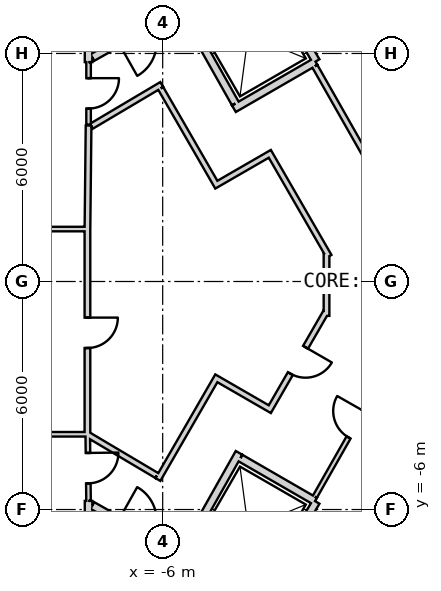
"""IFC4 building model, lengths in metres.
Left out: names, types, materials, properties, quantities, classifications, styles, units other than length and angle.
Written with IfcOpenShell. Run it as: python <this file> out.ifc"""

import sys

from ifc_helpers import new_model, si_unit, direction, frame, frame_2d, origin, place, context, subcontext, project, spatial, rectangle, extrude, element, fill, save


model = new_model("IFC4")
c1 = context("Model", 3, precision=1e-05, world=origin(), true_north=direction((0.0, 1.0)))
c2 = subcontext(c1, "Body", "Model", "MODEL_VIEW")
j1 = project(units=[si_unit("LENGTHUNIT", "METRE"), si_unit("PLANEANGLEUNIT", "RADIAN")], contexts=[c1])
p1 = place(None, origin())
s1 = spatial("IfcSite", under=j1, at=p1, CompositionType="ELEMENT")
p2 = place(p1, origin())
s2 = spatial("IfcBuilding", under=s1, at=p2, CompositionType="ELEMENT")
p3 = place(p2, frame((0.0, 0.0, 415.3)))
s3 = spatial("IfcBuildingStorey", under=s2, at=p3, CompositionType="ELEMENT", Elevation=415.3)
p4 = place(p3, frame((19.475, 2.208, 0.0), z_axis=(0.0, 0.0, 1.0), x_axis=(-0.866028369851, 0.499994862586, 0.0)))
e1 = element("IfcWall", 1, at=p4, inside=s3, PredefinedType="SHEAR", context=c2, shape_type="SweptSolid", body=[
    extrude(rectangle(XDim=31.523, YDim=0.9, at=frame_2d((15.762, 0.0))), origin(), (0.0, 0.0, 1.0), 5.0),
])
p5 = place(p4, frame((3.612, 0.0, 0.0)))
e2 = element("IfcOpeningElement", 2, at=p5, cuts=e1, PredefinedType="OPENING", context=c2, shape_type="SweptSolid", body=[
    extrude(rectangle(XDim=1.2, YDim=2.4, at=frame_2d((0.6, 1.2))), frame((0.0, 0.46, 0.0), z_axis=(0.0, -1.0, 0.0), x_axis=(1.0, 0.0, 0.0)), (0.0, 0.0, 1.0), 0.92),
])
p6 = place(p4, frame((26.712, 0.0, 0.0)))
e3 = element("IfcOpeningElement", 3, at=p6, cuts=e1, PredefinedType="OPENING", context=c2, shape_type="SweptSolid", body=[
    extrude(rectangle(XDim=1.2, YDim=2.4, at=frame_2d((0.6, 1.2))), frame((0.0, 0.46, 0.0), z_axis=(0.0, -1.0, 0.0), x_axis=(1.0, 0.0, 0.0)), (0.0, 0.0, 1.0), 0.92),
])
p7 = place(p3, frame((-7.825, -17.97, 0.0), z_axis=(0.0, 0.0, 1.0), x_axis=(0.866028369851, 0.499994862586, 0.0)))
e4 = element("IfcWall", 4, at=p7, inside=s3, PredefinedType="SHEAR", context=c2, shape_type="SweptSolid", body=[
    extrude(rectangle(XDim=31.523, YDim=0.9, at=frame_2d((15.762, 0.0))), origin(), (0.0, 0.0, 1.0), 5.0),
])
p8 = place(p7, frame((17.862, 0.0, 0.0)))
e5 = element("IfcOpeningElement", 5, at=p8, cuts=e4, PredefinedType="OPENING", context=c2, shape_type="SweptSolid", body=[
    extrude(rectangle(XDim=1.2, YDim=2.4, at=frame_2d((0.6, 1.2))), frame((0.0, 0.46, 0.0), z_axis=(0.0, -1.0, 0.0), x_axis=(1.0, 0.0, 0.0)), (0.0, 0.0, 1.0), 0.92),
])
p9 = place(p7, frame((20.562, 0.0, 0.0)))
e6 = element("IfcOpeningElement", 6, at=p9, cuts=e4, PredefinedType="OPENING", context=c2, shape_type="SweptSolid", body=[
    extrude(rectangle(XDim=1.2, YDim=2.4, at=frame_2d((0.6, 1.2))), frame((0.0, 0.46, 0.0), z_axis=(0.0, -1.0, 0.0), x_axis=(1.0, 0.0, 0.0)), (0.0, 0.0, 1.0), 0.92),
])
p10 = place(p7, frame((26.712, 0.0, 0.0)))
e7 = element("IfcOpeningElement", 7, at=p10, cuts=e4, PredefinedType="OPENING", context=c2, shape_type="SweptSolid", body=[
    extrude(rectangle(XDim=1.2, YDim=2.4, at=frame_2d((0.6, 1.2))), frame((0.0, 0.46, 0.0), z_axis=(0.0, -1.0, 0.0), x_axis=(1.0, 0.0, 0.0)), (0.0, 0.0, 1.0), 0.92),
])
p11 = place(p7, frame((3.612, 0.0, 0.0)))
e8 = element("IfcOpeningElement", 8, at=p11, cuts=e4, PredefinedType="OPENING", context=c2, shape_type="SweptSolid", body=[
    extrude(rectangle(XDim=1.2, YDim=2.4, at=frame_2d((0.6, 1.2))), frame((0.0, 0.46, 0.0), z_axis=(0.0, -1.0, 0.0), x_axis=(1.0, 0.0, 0.0)), (0.0, 0.0, 1.0), 0.92),
])
p12 = place(p3, frame((-3.538, 8.465, 0.0), z_axis=(0.0, 0.0, 1.0), x_axis=(0.508647062354, -0.860975125052, 0.0)))
e9 = element("IfcWall", 9, at=p12, inside=s3, PredefinedType="PLUMBINGWALL", context=c2, shape_type="SweptSolid", body=[
    extrude(rectangle(XDim=3.1, YDim=0.2, at=frame_2d((1.55, 0.0))), origin(), (0.0, 0.0, 1.0), 4.75),
])
p13 = place(p3, frame((-1.979, 5.786, 0.0), z_axis=(0.0, 0.0, 1.0), x_axis=(-0.866016689309, -0.500015093611, 0.0)))
e10 = element("IfcWall", 10, at=p13, inside=s3, PredefinedType="PLUMBINGWALL", context=c2, shape_type="SweptSolid", body=[
    extrude(rectangle(XDim=2.479, YDim=0.2, at=frame_2d((1.24, 0.0))), origin(), (0.0, 0.0, 1.0), 4.75),
])
p14 = place(p3, frame((-5.562, 7.296, 0.0), z_axis=(0.0, 0.0, 1.0), x_axis=(0.49134651263, -0.870964180966, 0.0)))
e11 = element("IfcWall", 11, at=p14, inside=s3, PredefinedType="PLUMBINGWALL", context=c2, shape_type="SweptSolid", body=[
    extrude(rectangle(XDim=3.0, YDim=0.2, at=frame_2d((1.5, 0.0))), origin(), (0.0, 0.0, 1.0), 4.75),
])
p15 = place(p3, frame((-1.961, -5.796, 0.0), z_axis=(0.0, 0.0, 1.0), x_axis=(-0.508647062354, -0.860975125052, 0.0)))
e12 = element("IfcWall", 12, at=p15, inside=s3, PredefinedType="PLUMBINGWALL", context=c2, shape_type="SweptSolid", body=[
    extrude(rectangle(XDim=3.1, YDim=0.2, at=frame_2d((1.55, 0.0))), origin(), (0.0, 0.0, 1.0), 4.75),
])
p16 = place(p3, frame((-3.99, -4.509, 0.0), z_axis=(0.0, 0.0, 1.0), x_axis=(-0.491358283181, -0.870957540612, 0.0)))
e13 = element("IfcWall", 13, at=p16, inside=s3, PredefinedType="PLUMBINGWALL", context=c2, shape_type="SweptSolid", body=[
    extrude(rectangle(XDim=3.2, YDim=0.2, at=frame_2d((1.6, 0.0))), origin(), (0.0, 0.0, 1.0), 4.75),
])
p17 = place(p3, frame((-3.953, -4.646, 0.0), z_axis=(0.0, 0.0, 1.0), x_axis=(0.866065302921, -0.4999308863, 0.0)))
e14 = element("IfcWall", 14, at=p17, inside=s3, PredefinedType="PLUMBINGWALL", context=c2, shape_type="SweptSolid", body=[
    extrude(rectangle(XDim=2.264, YDim=0.2, at=frame_2d((1.132, 0.0))), origin(), (0.0, 0.0, 1.0), 4.75),
])
p18 = place(p3, frame((-11.2, 1.38, 0.0), z_axis=(0.0, 0.0, 1.0), x_axis=(1.0, 0.0, 0.0)))
e15 = element("IfcWall", 15, at=p18, inside=s3, PredefinedType="PARTITIONING", context=c2, shape_type="SweptSolid", body=[
    extrude(rectangle(XDim=3.25, YDim=0.12, at=frame_2d((1.625, 0.0))), origin(), (0.0, 0.0, 1.0), 4.75),
])
p19 = place(p3, frame((-7.95, -9.55, 0.0), z_axis=(0.0, 0.0, 1.0), x_axis=(0.0, 1.0, 0.0)))
e16 = element("IfcWall", 16, at=p19, inside=s3, PredefinedType="PARTITIONING", context=c2, shape_type="SweptSolid", body=[
    extrude(rectangle(XDim=3.778, YDim=0.2, at=frame_2d((1.889, 0.0))), origin(), (0.0, 0.0, 1.0), 4.75),
])
p20 = place(p3, frame((-7.95, 5.772, 0.0), z_axis=(0.0, 0.0, 1.0), x_axis=(0.0, 1.0, 0.0)))
e17 = element("IfcWall", 17, at=p20, inside=s3, PredefinedType="PARTITIONING", context=c2, shape_type="SweptSolid", body=[
    extrude(rectangle(XDim=3.578, YDim=0.2, at=frame_2d((1.789, 0.0))), origin(), (0.0, 0.0, 1.0), 4.75),
])
p21 = place(p3, frame((-7.95, 4.105, 0.0), z_axis=(0.0, 0.0, 1.0), x_axis=(-0.010899742406, -0.999940596043, 0.0)))
e18 = element("IfcWall", 18, at=p21, inside=s3, PredefinedType="PLUMBINGWALL", context=c2, shape_type="SweptSolid", body=[
    extrude(rectangle(XDim=2.755, YDim=0.15, at=frame_2d((1.377, 0.0))), origin(), (0.0, 0.0, 1.0), 4.75),
])
p22 = place(p3, frame((-7.95, 4.128, 0.0), z_axis=(0.0, 0.0, 1.0), x_axis=(0.0, 1.0, 0.0)))
e19 = element("IfcWall", 19, at=p22, inside=s3, PredefinedType="PARTITIONING", context=c2, shape_type="SweptSolid", body=[
    extrude(rectangle(XDim=1.644, YDim=0.12, at=frame_2d((0.822, 0.0))), origin(), (0.0, 0.0, 1.0), 4.75),
])
p23 = place(p22, frame((0.422, 0.0, 0.0)))
e20 = element("IfcOpeningElement", 20, at=p23, cuts=e19, PredefinedType="OPENING", context=c2, shape_type="SweptSolid", body=[
    extrude(rectangle(XDim=0.8, YDim=2.1, at=frame_2d((0.4, 1.05))), frame((0.0, 0.07, 0.0), z_axis=(0.0, -1.0, 0.0), x_axis=(1.0, 0.0, 0.0)), (0.0, 0.0, 1.0), 0.14),
])
p24 = place(p3, frame((-11.2, -4.02, 0.0), z_axis=(0.0, 0.0, 1.0), x_axis=(1.0, 0.0, 0.0)))
e21 = element("IfcWall", 21, at=p24, inside=s3, PredefinedType="PARTITIONING", context=c2, shape_type="SweptSolid", body=[
    extrude(rectangle(XDim=3.25, YDim=0.12, at=frame_2d((1.625, 0.0))), origin(), (0.0, 0.0, 1.0), 4.75),
])
p25 = place(p24, frame((1.225, 0.0, 0.0)))
e22 = element("IfcOpeningElement", 22, at=p25, cuts=e21, PredefinedType="OPENING", context=c2, shape_type="SweptSolid", body=[
    extrude(rectangle(XDim=0.8, YDim=2.1, at=frame_2d((0.4, 1.05))), frame((0.0, 0.07, 0.0), z_axis=(0.0, -1.0, 0.0), x_axis=(1.0, 0.0, 0.0)), (0.0, 0.0, 1.0), 0.14),
])
p26 = place(p3, frame((-7.98, 1.35, 0.0), z_axis=(0.0, 0.0, 1.0), x_axis=(0.0, -1.0, 0.0)))
e23 = element("IfcWall", 23, at=p26, inside=s3, PredefinedType="PLUMBINGWALL", context=c2, shape_type="SweptSolid", body=[
    extrude(rectangle(XDim=5.4, YDim=0.15, at=frame_2d((2.7, 0.0))), origin(), (0.0, 0.0, 1.0), 4.75),
])
p27 = place(p26, frame((2.3, 0.0, 0.0)))
e24 = element("IfcOpeningElement", 24, at=p27, cuts=e23, PredefinedType="OPENING", context=c2, shape_type="SweptSolid", body=[
    extrude(rectangle(XDim=0.8, YDim=2.1, at=frame_2d((0.4, 1.05))), frame((0.0, 0.085, 0.0), z_axis=(0.0, -1.0, 0.0), x_axis=(1.0, 0.0, 0.0)), (0.0, 0.0, 1.0), 0.17),
])
p28 = place(p3, frame((-7.951, -5.772, 0.0), z_axis=(0.0, 0.0, 1.0), x_axis=(-0.012047318415, 0.999927428426, 0.0)))
e25 = element("IfcWall", 25, at=p28, inside=s3, PredefinedType="PARTITIONING", context=c2, shape_type="SweptSolid", body=[
    extrude(rectangle(XDim=1.723, YDim=0.12, at=frame_2d((0.861, 0.0))), origin(), (0.0, 0.0, 1.0), 4.75),
])
p29 = place(p28, frame((0.461, 0.0, 0.0)))
e26 = element("IfcOpeningElement", 26, at=p29, cuts=e25, PredefinedType="OPENING", context=c2, shape_type="SweptSolid", body=[
    extrude(rectangle(XDim=0.8, YDim=2.1, at=frame_2d((0.4, 1.05))), frame((0.0, 0.07, 0.0), z_axis=(0.0, -1.0, 0.0), x_axis=(1.0, 0.0, 0.0)), (0.0, 0.0, 1.0), 0.14),
])
p30 = place(p3, frame((-5.6, 7.16, 0.0), z_axis=(0.0, 0.0, 1.0), x_axis=(-0.871350695252, -0.490660744185, 0.0)))
e27 = element("IfcWall", 27, at=p30, inside=s3, PredefinedType="PARTITIONING", context=c2, shape_type="SweptSolid", body=[
    extrude(rectangle(XDim=2.582, YDim=0.2, at=frame_2d((1.291, 0.0))), origin(), (0.0, 0.0, 1.0), 4.75),
])
p31 = place(p30, frame((0.791, 0.0, 0.0)))
e28 = element("IfcOpeningElement", 28, at=p31, cuts=e27, PredefinedType="OPENING", context=c2, shape_type="SweptSolid", body=[
    extrude(rectangle(XDim=1.0, YDim=2.1, at=frame_2d((0.5, 1.05))), frame((0.0, 0.11, 0.0), z_axis=(0.0, -1.0, 0.0), x_axis=(1.0, 0.0, 0.0)), (0.0, 0.0, 1.0), 0.22),
])
p32 = place(p3, frame((-7.85, -5.893, 0.0), z_axis=(0.0, 0.0, 1.0), x_axis=(0.871350695252, -0.490660744185, 0.0)))
e29 = element("IfcWall", 29, at=p32, inside=s3, PredefinedType="PARTITIONING", context=c2, shape_type="SweptSolid", body=[
    extrude(rectangle(XDim=2.582, YDim=0.2, at=frame_2d((1.291, 0.0))), origin(), (0.0, 0.0, 1.0), 4.75),
])
p33 = place(p32, frame((0.791, 0.0, 0.0)))
e30 = element("IfcOpeningElement", 30, at=p33, cuts=e29, PredefinedType="OPENING", context=c2, shape_type="SweptSolid", body=[
    extrude(rectangle(XDim=1.0, YDim=2.1, at=frame_2d((0.5, 1.05))), frame((0.0, 0.11, 0.0), z_axis=(0.0, -1.0, 0.0), x_axis=(1.0, 0.0, 0.0)), (0.0, 0.0, 1.0), 0.22),
])
p34 = place(p3, frame((-1.994, 5.661, 0.0), z_axis=(0.0, 0.0, 1.0), x_axis=(0.494341211302, -0.869267948798, 0.0)))
e31 = element("IfcWall", 31, at=p34, inside=s3, PredefinedType="PLUMBINGWALL", context=c2, shape_type="SweptSolid", body=[
    extrude(rectangle(XDim=4.361, YDim=0.15, at=frame_2d((2.18, 0.0))), origin(), (0.0, 0.0, 1.0), 4.75),
])
p35 = place(p3, frame((0.224, -1.761, 0.0), z_axis=(0.0, 0.0, 1.0), x_axis=(-0.494327216836, -0.869275907118, 0.0)))
e32 = element("IfcWall", 32, at=p35, inside=s3, PredefinedType="PARTITIONING", context=c2, shape_type="SweptSolid", body=[
    extrude(rectangle(XDim=4.487, YDim=0.12, at=frame_2d((2.244, 0.0))), origin(), (0.0, 0.0, 1.0), 4.75),
])
p36 = place(p35, frame((1.895, 0.0, 0.0)))
e33 = element("IfcOpeningElement", 33, at=p36, cuts=e32, PredefinedType="OPENING", context=c2, shape_type="SweptSolid", body=[
    extrude(rectangle(XDim=0.8, YDim=2.1, at=frame_2d((0.4, 1.05))), frame((0.0, 0.07, 0.0), z_axis=(0.0, -1.0, 0.0), x_axis=(1.0, 0.0, 0.0)), (0.0, 0.0, 1.0), 0.14),
])
p37 = place(p3, frame((-6.024, 5.183, 0.0), z_axis=(0.0, 0.0, 1.0), x_axis=(-0.860114558627, -0.510100917503, 0.0)))
e34 = element("IfcWall", 34, at=p37, inside=s3, PredefinedType="PLUMBINGWALL", context=c2, shape_type="SweptSolid", body=[
    extrude(rectangle(XDim=2.152, YDim=0.15, at=frame_2d((1.076, 0.0))), origin(), (0.0, 0.0, 1.0), 4.75),
])
p38 = place(p3, frame((-4.551, 2.482, 0.0), z_axis=(0.0, 0.0, 1.0), x_axis=(-0.499990139034, 0.866031096941, 0.0)))
e35 = element("IfcWall", 35, at=p38, inside=s3, PredefinedType="PLUMBINGWALL", context=c2, shape_type="SweptSolid", body=[
    extrude(rectangle(XDim=3.0, YDim=0.15, at=frame_2d((1.5, 0.0))), origin(), (0.0, 0.0, 1.0), 4.75),
])
p39 = place(p3, frame((-3.116, 3.397, 0.0), z_axis=(0.0, 0.0, 1.0), x_axis=(-0.866053003207, -0.499952193351, 0.0)))
e36 = element("IfcWall", 36, at=p39, inside=s3, PredefinedType="PLUMBINGWALL", context=c2, shape_type="SweptSolid", body=[
    extrude(rectangle(XDim=1.625, YDim=0.15, at=frame_2d((0.812, 0.0))), origin(), (0.0, 0.0, 1.0), 4.75),
])
p40 = place(p3, frame((-1.624, 0.663, 0.0), z_axis=(0.0, 0.0, 1.0), x_axis=(-0.500035348339, 0.866004994449, 0.0)))
e37 = element("IfcWall", 37, at=p40, inside=s3, PredefinedType="PLUMBINGWALL", context=c2, shape_type="SweptSolid", body=[
    extrude(rectangle(XDim=3.039, YDim=0.15, at=frame_2d((1.52, 0.0))), origin(), (0.0, 0.0, 1.0), 4.75),
])
p41 = place(p3, frame((-1.689, -0.905, 0.0), z_axis=(0.0, 0.0, 1.0), x_axis=(0.0, 1.0, 0.0)))
e38 = element("IfcWall", 38, at=p41, inside=s3, PredefinedType="PLUMBINGWALL", context=c2, shape_type="SweptSolid", body=[
    extrude(rectangle(XDim=1.656, YDim=0.15, at=frame_2d((0.828, 0.0))), origin(), (0.0, 0.0, 1.0), 4.75),
])
p42 = place(p3, frame((-3.219, -3.425, 0.0), z_axis=(0.0, 0.0, 1.0), x_axis=(0.499996236806, 0.866027576455, 0.0)))
e39 = element("IfcWall", 39, at=p42, inside=s3, PredefinedType="PLUMBINGWALL", context=c2, shape_type="SweptSolid", body=[
    extrude(rectangle(XDim=3.036, YDim=0.15, at=frame_2d((1.518, 0.0))), origin(), (0.0, 0.0, 1.0), 4.75),
])
p43 = place(p42, frame((1.156, 0.0, 0.0)))
e40 = element("IfcOpeningElement", 40, at=p43, cuts=e39, PredefinedType="OPENING", context=c2, shape_type="SweptSolid", body=[
    extrude(rectangle(XDim=0.8, YDim=2.1, at=frame_2d((0.4, 1.05))), frame((0.0, 0.085, 0.0), z_axis=(0.0, -1.0, 0.0), x_axis=(1.0, 0.0, 0.0)), (0.0, 0.0, 1.0), 0.17),
])
p44 = place(p3, frame((-4.653, -2.51, 0.0), z_axis=(0.0, 0.0, 1.0), x_axis=(0.866053003207, -0.499952193351, 0.0)))
e41 = element("IfcWall", 41, at=p44, inside=s3, PredefinedType="PLUMBINGWALL", context=c2, shape_type="SweptSolid", body=[
    extrude(rectangle(XDim=1.625, YDim=0.15, at=frame_2d((0.812, 0.0))), origin(), (0.0, 0.0, 1.0), 4.75),
])
p45 = place(p3, frame((-6.126, -5.21, 0.0), z_axis=(0.0, 0.0, 1.0), x_axis=(0.499990139034, 0.866031096941, 0.0)))
e42 = element("IfcWall", 42, at=p45, inside=s3, PredefinedType="PLUMBINGWALL", context=c2, shape_type="SweptSolid", body=[
    extrude(rectangle(XDim=3.0, YDim=0.15, at=frame_2d((1.5, 0.0))), origin(), (0.0, 0.0, 1.0), 4.75),
])
p46 = place(p3, frame((-7.95, -4.041, 0.0), z_axis=(0.0, 0.0, 1.0), x_axis=(0.860090281069, -0.510141851263, 0.0)))
e43 = element("IfcWall", 43, at=p46, inside=s3, PredefinedType="PLUMBINGWALL", context=c2, shape_type="SweptSolid", body=[
    extrude(rectangle(XDim=2.089, YDim=0.15, at=frame_2d((1.045, 0.0))), origin(), (0.0, 0.0, 1.0), 4.75),
])
p47 = place(p36, origin())
e44 = element("IfcDoor", 44, at=p47, inside=s3, OperationType="SINGLE_SWING_LEFT", PredefinedType="USERDEFINED", context=c2, shape_type="SweptSolid", body=[
    extrude(rectangle(XDim=0.8, YDim=2.1, at=frame_2d((0.4, 1.05))), frame((0.0, 0.025, 0.0), z_axis=(0.0, -1.0, 0.0), x_axis=(1.0, 0.0, 0.0)), (0.0, 0.0, 1.0), 0.05),
])
fill(e33, e44)
p48 = place(p43, origin())
e45 = element("IfcDoor", 45, at=p48, inside=s3, OperationType="SINGLE_SWING_RIGHT", PredefinedType="USERDEFINED", context=c2, shape_type="SweptSolid", body=[
    extrude(rectangle(XDim=0.8, YDim=2.1, at=frame_2d((0.4, 1.05))), frame((0.0, 0.025, 0.0), z_axis=(0.0, -1.0, 0.0), x_axis=(1.0, 0.0, 0.0)), (0.0, 0.0, 1.0), 0.05),
])
fill(e40, e45)
p49 = place(p23, origin())
e46 = element("IfcDoor", 46, at=p49, inside=s3, OperationType="SINGLE_SWING_RIGHT", PredefinedType="USERDEFINED", context=c2, shape_type="SweptSolid", body=[
    extrude(rectangle(XDim=0.8, YDim=2.1, at=frame_2d((0.4, 1.05))), frame((0.0, 0.025, 0.0), z_axis=(0.0, -1.0, 0.0), x_axis=(1.0, 0.0, 0.0)), (0.0, 0.0, 1.0), 0.05),
])
fill(e20, e46)
p50 = place(p29, origin())
e47 = element("IfcDoor", 47, at=p50, inside=s3, OperationType="SINGLE_SWING_RIGHT", PredefinedType="USERDEFINED", context=c2, shape_type="SweptSolid", body=[
    extrude(rectangle(XDim=0.8, YDim=2.1, at=frame_2d((0.4, 1.05))), frame((0.0, 0.025, 0.0), z_axis=(0.0, -1.0, 0.0), x_axis=(1.0, 0.0, 0.0)), (0.0, 0.0, 1.0), 0.05),
])
fill(e26, e47)
p51 = place(p27, origin())
e48 = element("IfcDoor", 48, at=p51, inside=s3, OperationType="SINGLE_SWING_LEFT", PredefinedType="USERDEFINED", context=c2, shape_type="SweptSolid", body=[
    extrude(rectangle(XDim=0.8, YDim=2.1, at=frame_2d((0.4, 1.05))), frame((0.0, 0.025, 0.0), z_axis=(0.0, -1.0, 0.0), x_axis=(1.0, 0.0, 0.0)), (0.0, 0.0, 1.0), 0.05),
])
fill(e24, e48)
save(model, sys.argv[1])
